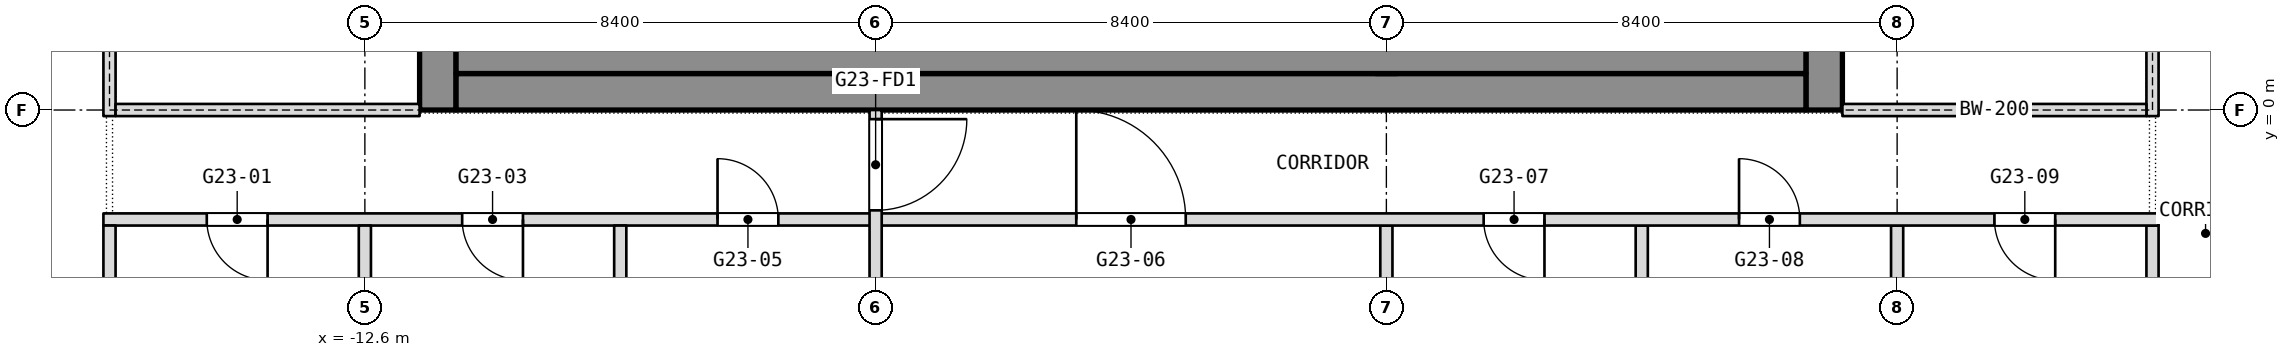
"""IFC4 building model, lengths in metres.
Left out: names, types, materials, properties, quantities, classifications, styles, units other than length and angle.
Written with IfcOpenShell. Run it as: python <this file> out.ifc"""

import sys

from ifc_helpers import new_model, si_unit, direction, frame, frame_2d, origin, place, context, subcontext, project, spatial, rectangle, extrude, element, fill, save


model = new_model("IFC4")
c1 = context("Model", 3, precision=1e-05, world=origin(), true_north=direction((0.0, 1.0)))
c2 = subcontext(c1, "Body", "Model", "MODEL_VIEW")
j1 = project(units=[si_unit("LENGTHUNIT", "METRE"), si_unit("PLANEANGLEUNIT", "RADIAN")], contexts=[c1])
p1 = place(None, origin())
s1 = spatial("IfcSite", under=j1, at=p1, CompositionType="ELEMENT")
p2 = place(p1, origin())
s2 = spatial("IfcBuilding", under=s1, at=p2, CompositionType="ELEMENT")
p3 = place(p2, frame((0.0, 0.0, 277.7)))
s3 = spatial("IfcBuildingStorey", under=s2, at=p3, CompositionType="ELEMENT", Elevation=277.7)
p4 = place(p3, frame((11.4, 0.0, 0.0), z_axis=(0.0, 0.0, 1.0), x_axis=(0.0, 1.0, 0.0)))
e1 = element("IfcWall", 1, at=p4, inside=s3, PredefinedType="SHEAR", context=c2, shape_type="SweptSolid", body=[
    extrude(rectangle(XDim=16.8, YDim=0.6, at=frame_2d((8.4, 0.0))), origin(), (0.0, 0.0, 1.0), 3.6),
])
p5 = place(p4, frame((2.3, 0.0, 0.0)))
e2 = element("IfcOpeningElement", 2, at=p5, cuts=e1, PredefinedType="OPENING", context=c2, shape_type="SweptSolid", body=[
    extrude(rectangle(XDim=1.1, YDim=2.1, at=frame_2d((0.55, 1.05))), frame((0.0, 0.3, 0.0), z_axis=(0.0, -1.0, 0.0), x_axis=(1.0, 0.0, 0.0)), (0.0, 0.0, 1.0), 0.6),
])
p6 = place(p4, frame((4.85, 0.0, 0.0)))
e3 = element("IfcOpeningElement", 3, at=p6, cuts=e1, PredefinedType="OPENING", context=c2, shape_type="SweptSolid", body=[
    extrude(rectangle(XDim=1.1, YDim=2.1, at=frame_2d((0.55, 1.05))), frame((0.0, 0.3, 0.0), z_axis=(0.0, -1.0, 0.0), x_axis=(1.0, 0.0, 0.0)), (0.0, 0.0, 1.0), 0.6),
])
p7 = place(p4, frame((6.825, 0.0, 0.0)))
e4 = element("IfcOpeningElement", 4, at=p7, cuts=e1, PredefinedType="OPENING", context=c2, shape_type="SweptSolid", body=[
    extrude(rectangle(XDim=1.2, YDim=2.1, at=frame_2d((0.6, 1.05))), frame((0.0, 0.3, 0.0), z_axis=(0.0, -1.0, 0.0), x_axis=(1.0, 0.0, 0.0)), (0.0, 0.0, 1.0), 0.6),
])
p8 = place(p4, frame((13.4, 0.0, 0.0)))
e5 = element("IfcOpeningElement", 5, at=p8, cuts=e1, PredefinedType="OPENING", context=c2, shape_type="SweptSolid", body=[
    extrude(rectangle(XDim=1.1, YDim=2.1, at=frame_2d((0.55, 1.05))), frame((0.0, 0.3, 0.0), z_axis=(0.0, -1.0, 0.0), x_axis=(1.0, 0.0, 0.0)), (0.0, 0.0, 1.0), 0.6),
])
p9 = place(p4, frame((10.85, 0.0, 0.0)))
e6 = element("IfcOpeningElement", 6, at=p9, cuts=e1, PredefinedType="OPENING", context=c2, shape_type="SweptSolid", body=[
    extrude(rectangle(XDim=1.1, YDim=2.1, at=frame_2d((0.55, 1.05))), frame((0.0, 0.3, 0.0), z_axis=(0.0, -1.0, 0.0), x_axis=(1.0, 0.0, 0.0)), (0.0, 0.0, 1.0), 0.6),
])
p10 = place(p4, frame((8.775, 0.0, 0.0)))
e7 = element("IfcOpeningElement", 7, at=p10, cuts=e1, PredefinedType="OPENING", context=c2, shape_type="SweptSolid", body=[
    extrude(rectangle(XDim=1.2, YDim=2.1, at=frame_2d((0.6, 1.05))), frame((0.0, 0.3, 0.0), z_axis=(0.0, -1.0, 0.0), x_axis=(1.0, 0.0, 0.0)), (0.0, 0.0, 1.0), 0.6),
])
p11 = place(p3, frame((-11.4, 0.0, 0.0), z_axis=(0.0, 0.0, 1.0), x_axis=(0.0, 1.0, 0.0)))
e8 = element("IfcWall", 8, at=p11, inside=s3, PredefinedType="SHEAR", context=c2, shape_type="SweptSolid", body=[
    extrude(rectangle(XDim=16.8, YDim=0.6, at=frame_2d((8.4, 0.0))), origin(), (0.0, 0.0, 1.0), 3.6),
])
p12 = place(p11, frame((1.688, 0.0, 0.0)))
e9 = element("IfcOpeningElement", 9, at=p12, cuts=e8, PredefinedType="OPENING", context=c2, shape_type="SweptSolid", body=[
    extrude(rectangle(XDim=0.9, YDim=2.1, at=frame_2d((0.45, 1.05))), frame((0.0, 0.3, 0.0), z_axis=(0.0, -1.0, 0.0), x_axis=(1.0, 0.0, 0.0)), (0.0, 0.0, 1.0), 0.6),
])
p13 = place(p11, frame((4.312, 0.0, 0.0)))
e10 = element("IfcOpeningElement", 10, at=p13, cuts=e8, PredefinedType="OPENING", context=c2, shape_type="SweptSolid", body=[
    extrude(rectangle(XDim=0.9, YDim=2.1, at=frame_2d((0.45, 1.05))), frame((0.0, 0.3, 0.0), z_axis=(0.0, -1.0, 0.0), x_axis=(1.0, 0.0, 0.0)), (0.0, 0.0, 1.0), 0.6),
])
p14 = place(p11, frame((6.825, 0.0, 0.0)))
e11 = element("IfcOpeningElement", 11, at=p14, cuts=e8, PredefinedType="OPENING", context=c2, shape_type="SweptSolid", body=[
    extrude(rectangle(XDim=1.2, YDim=2.1, at=frame_2d((0.6, 1.05))), frame((0.0, 0.3, 0.0), z_axis=(0.0, -1.0, 0.0), x_axis=(1.0, 0.0, 0.0)), (0.0, 0.0, 1.0), 0.6),
])
p15 = place(p11, frame((12.3, 0.0, 0.0)))
e12 = element("IfcOpeningElement", 12, at=p15, cuts=e8, PredefinedType="OPENING", context=c2, shape_type="SweptSolid", body=[
    extrude(rectangle(XDim=0.9, YDim=2.1, at=frame_2d((0.45, 1.05))), frame((0.0, 0.3, 0.0), z_axis=(0.0, -1.0, 0.0), x_axis=(1.0, 0.0, 0.0)), (0.0, 0.0, 1.0), 0.6),
])
p16 = place(p11, frame((8.775, 0.0, 0.0)))
e13 = element("IfcOpeningElement", 13, at=p16, cuts=e8, PredefinedType="OPENING", context=c2, shape_type="SweptSolid", body=[
    extrude(rectangle(XDim=1.2, YDim=2.1, at=frame_2d((0.6, 1.05))), frame((0.0, 0.3, 0.0), z_axis=(0.0, -1.0, 0.0), x_axis=(1.0, 0.0, 0.0)), (0.0, 0.0, 1.0), 0.6),
])
p17 = place(p3, frame((-11.1, 0.3, 0.0), z_axis=(0.0, 0.0, 1.0), x_axis=(1.0, 0.0, 0.0)))
e14 = element("IfcWall", 14, at=p17, inside=s3, PredefinedType="SHEAR", context=c2, shape_type="SweptSolid", body=[
    extrude(rectangle(XDim=22.2, YDim=0.6, at=frame_2d((11.1, 0.0))), origin(), (0.0, 0.0, 1.0), 3.6),
])
p18 = place(p3, frame((-4.2, 0.6, 0.0), z_axis=(0.0, 0.0, 1.0), x_axis=(0.0, 1.0, 0.0)))
e15 = element("IfcWall", 15, at=p18, inside=s3, PredefinedType="SHEAR", context=c2, shape_type="SweptSolid", body=[
    extrude(rectangle(XDim=15.6, YDim=0.35, at=frame_2d((7.8, 0.0))), origin(), (0.0, 0.0, 1.0), 3.6),
])
p19 = place(p18, frame((8.7, 0.0, 0.0)))
e16 = element("IfcOpeningElement", 16, at=p19, cuts=e15, PredefinedType="OPENING", context=c2, shape_type="SweptSolid", body=[
    extrude(rectangle(XDim=1.2, YDim=2.1, at=frame_2d((0.6, 1.05))), frame((0.0, 0.175, 0.0), z_axis=(0.0, -1.0, 0.0), x_axis=(1.0, 0.0, 0.0)), (0.0, 0.0, 1.0), 0.35),
])
p20 = place(p3, frame((4.2, 0.6, 0.0), z_axis=(0.0, 0.0, 1.0), x_axis=(0.0, 1.0, 0.0)))
e17 = element("IfcWall", 17, at=p20, inside=s3, PredefinedType="SHEAR", context=c2, shape_type="SweptSolid", body=[
    extrude(rectangle(XDim=15.6, YDim=0.35, at=frame_2d((7.8, 0.0))), origin(), (0.0, 0.0, 1.0), 3.6),
])
p21 = place(p20, frame((6.15, 0.0, 0.0)))
e18 = element("IfcOpeningElement", 18, at=p21, cuts=e17, PredefinedType="OPENING", context=c2, shape_type="SweptSolid", body=[
    extrude(rectangle(XDim=1.2, YDim=2.1, at=frame_2d((0.6, 1.05))), frame((0.0, 0.175, 0.0), z_axis=(0.0, -1.0, 0.0), x_axis=(1.0, 0.0, 0.0)), (0.0, 0.0, 1.0), 0.35),
])
p22 = place(p3, frame((16.8, -11.8, 0.0), z_axis=(0.0, 0.0, 1.0), x_axis=(0.0, 1.0, 0.0)))
e19 = element("IfcWall", 19, at=p22, inside=s3, PredefinedType="PARTITIONING", context=c2, shape_type="SweptSolid", body=[
    extrude(rectangle(XDim=9.9, YDim=0.2, at=frame_2d((4.95, 0.0))), origin(), (0.0, 0.0, 1.0), 3.34),
])
for number, where, z_axis, x_axis in (
    (20, (12.6, -11.6, 0.0), (0.0, 0.0, 1.0), (0.0, 1.0, 0.0)),
    (21, (8.4, -11.6, 0.0), (0.0, 0.0, 1.0), (0.0, 1.0, 0.0)),
    (22, (4.2, -11.6, 0.0), (0.0, 0.0, 1.0), (0.0, 1.0, 0.0)),
):
    element("IfcWall", number, at=place(p3, frame(where, z_axis=z_axis, x_axis=x_axis)), inside=s3, PredefinedType="PARTITIONING", context=c2, shape_type="SweptSolid", body=[
        extrude(rectangle(XDim=9.7, YDim=0.2, at=frame_2d((4.85, 0.0))), origin(), (0.0, 0.0, 1.0), 3.34),
    ])
p23 = place(p3, frame((-16.9, -1.8, 0.0), z_axis=(0.0, 0.0, 1.0), x_axis=(1.0, 0.0, 0.0)))
e23 = element("IfcWall", 23, at=p23, inside=s3, PredefinedType="PARTITIONING", context=c2, shape_type="SweptSolid", body=[
    extrude(rectangle(XDim=33.8, YDim=0.2, at=frame_2d((16.9, 0.0))), origin(), (0.0, 0.0, 1.0), 3.34),
])
p24 = place(p23, frame((1.7, 0.0, 0.0)))
e24 = element("IfcOpeningElement", 24, at=p24, cuts=e23, PredefinedType="OPENING", context=c2, shape_type="SweptSolid", body=[
    extrude(rectangle(XDim=1.0, YDim=2.1, at=frame_2d((0.5, 1.05))), frame((0.0, 0.1, 0.0), z_axis=(0.0, -1.0, 0.0), x_axis=(1.0, 0.0, 0.0)), (0.0, 0.0, 1.0), 0.2),
])
p25 = place(p23, frame((5.9, 0.0, 0.0)))
e25 = element("IfcOpeningElement", 25, at=p25, cuts=e23, PredefinedType="OPENING", context=c2, shape_type="SweptSolid", body=[
    extrude(rectangle(XDim=1.0, YDim=2.1, at=frame_2d((0.5, 1.05))), frame((0.0, 0.1, 0.0), z_axis=(0.0, -1.0, 0.0), x_axis=(1.0, 0.0, 0.0)), (0.0, 0.0, 1.0), 0.2),
])
p26 = place(p23, frame((10.1, 0.0, 0.0)))
e26 = element("IfcOpeningElement", 26, at=p26, cuts=e23, PredefinedType="OPENING", context=c2, shape_type="SweptSolid", body=[
    extrude(rectangle(XDim=1.0, YDim=2.1, at=frame_2d((0.5, 1.05))), frame((0.0, 0.1, 0.0), z_axis=(0.0, -1.0, 0.0), x_axis=(1.0, 0.0, 0.0)), (0.0, 0.0, 1.0), 0.2),
])
p27 = place(p23, frame((16.0, 0.0, 0.0)))
e27 = element("IfcOpeningElement", 27, at=p27, cuts=e23, PredefinedType="OPENING", context=c2, shape_type="SweptSolid", body=[
    extrude(rectangle(XDim=1.8, YDim=2.1, at=frame_2d((0.9, 1.05))), frame((0.0, 0.1, 0.0), z_axis=(0.0, -1.0, 0.0), x_axis=(1.0, 0.0, 0.0)), (0.0, 0.0, 1.0), 0.2),
])
p28 = place(p23, frame((22.7, 0.0, 0.0)))
e28 = element("IfcOpeningElement", 28, at=p28, cuts=e23, PredefinedType="OPENING", context=c2, shape_type="SweptSolid", body=[
    extrude(rectangle(XDim=1.0, YDim=2.1, at=frame_2d((0.5, 1.05))), frame((0.0, 0.1, 0.0), z_axis=(0.0, -1.0, 0.0), x_axis=(1.0, 0.0, 0.0)), (0.0, 0.0, 1.0), 0.2),
])
p29 = place(p23, frame((26.9, 0.0, 0.0)))
e29 = element("IfcOpeningElement", 29, at=p29, cuts=e23, PredefinedType="OPENING", context=c2, shape_type="SweptSolid", body=[
    extrude(rectangle(XDim=1.0, YDim=2.1, at=frame_2d((0.5, 1.05))), frame((0.0, 0.1, 0.0), z_axis=(0.0, -1.0, 0.0), x_axis=(1.0, 0.0, 0.0)), (0.0, 0.0, 1.0), 0.2),
])
p30 = place(p23, frame((31.1, 0.0, 0.0)))
e30 = element("IfcOpeningElement", 30, at=p30, cuts=e23, PredefinedType="OPENING", context=c2, shape_type="SweptSolid", body=[
    extrude(rectangle(XDim=1.0, YDim=2.1, at=frame_2d((0.5, 1.05))), frame((0.0, 0.1, 0.0), z_axis=(0.0, -1.0, 0.0), x_axis=(1.0, 0.0, 0.0)), (0.0, 0.0, 1.0), 0.2),
])
p31 = place(p3, frame((-4.2, -13.6, 0.0), z_axis=(0.0, 0.0, 1.0), x_axis=(0.0, 1.0, 0.0)))
e31 = element("IfcWall", 31, at=p31, inside=s3, PredefinedType="PARTITIONING", context=c2, shape_type="SweptSolid", body=[
    extrude(rectangle(XDim=13.6, YDim=0.2, at=frame_2d((6.8, 0.0))), origin(), (0.0, 0.0, 1.0), 3.34),
])
p32 = place(p31, frame((11.95, 0.0, 0.0)))
e32 = element("IfcOpeningElement", 32, at=p32, cuts=e31, PredefinedType="OPENING", context=c2, shape_type="SweptSolid", body=[
    extrude(rectangle(XDim=1.5, YDim=2.1, at=frame_2d((0.75, 1.05))), frame((0.0, 0.1, 0.0), z_axis=(0.0, -1.0, 0.0), x_axis=(1.0, 0.0, 0.0)), (0.0, 0.0, 1.0), 0.2),
])
p33 = place(p31, frame((0.25, 0.0, 0.0)))
e33 = element("IfcOpeningElement", 33, at=p33, cuts=e31, PredefinedType="OPENING", context=c2, shape_type="SweptSolid", body=[
    extrude(rectangle(XDim=1.5, YDim=2.1, at=frame_2d((0.75, 1.05))), frame((0.0, 0.1, 0.0), z_axis=(0.0, -1.0, 0.0), x_axis=(1.0, 0.0, 0.0)), (0.0, 0.0, 1.0), 0.2),
])
for number, where, z_axis, x_axis in (
    (34, (-8.4, -8.5, 0.0), (0.0, 0.0, 1.0), (0.0, 1.0, 0.0)),
    (35, (-12.6, -8.5, 0.0), (0.0, 0.0, 1.0), (0.0, 1.0, 0.0)),
):
    element("IfcWall", number, at=place(p3, frame(where, z_axis=z_axis, x_axis=x_axis)), inside=s3, PredefinedType="PARTITIONING", context=c2, shape_type="SweptSolid", body=[
        extrude(rectangle(XDim=6.6, YDim=0.2, at=frame_2d((3.3, 0.0))), origin(), (0.0, 0.0, 1.0), 3.34),
    ])
p34 = place(p3, frame((-16.8, -8.7, 0.0), z_axis=(0.0, 0.0, 1.0), x_axis=(0.0, 1.0, 0.0)))
e36 = element("IfcWall", 36, at=p34, inside=s3, PredefinedType="PARTITIONING", context=c2, shape_type="SweptSolid", body=[
    extrude(rectangle(XDim=6.8, YDim=0.2, at=frame_2d((3.4, 0.0))), origin(), (0.0, 0.0, 1.0), 3.34),
])
p35 = place(p3, frame((-11.1, 1.05, 0.0), z_axis=(0.0, 0.0, 1.0), x_axis=(1.0, 0.0, 0.0)))
e37 = element("IfcWall", 37, at=p35, inside=s3, PredefinedType="PARTITIONING", context=c2, shape_type="SweptSolid", body=[
    extrude(rectangle(XDim=22.2, YDim=0.9, at=frame_2d((11.1, 0.0))), origin(), (0.0, 0.0, 1.0), 3.34),
])
p36 = place(p3, frame((-16.8, -0.1, 0.0), z_axis=(0.0, 0.0, 1.0), x_axis=(0.0, 1.0, 0.0)))
e38 = element("IfcWall", 38, at=p36, inside=s3, PredefinedType="PARTITIONING", context=c2, shape_type="SweptSolid", body=[
    extrude(rectangle(XDim=17.0, YDim=0.2, at=frame_2d((8.5, 0.0))), origin(), (0.0, 0.0, 1.0), 3.34),
])
p37 = place(p36, frame((2.2, 0.0, 0.0)))
e39 = element("IfcOpeningElement", 39, at=p37, cuts=e38, PredefinedType="OPENING", context=c2, shape_type="SweptSolid", body=[
    extrude(rectangle(XDim=1.8, YDim=2.1, at=frame_2d((0.9, 1.05))), frame((0.0, 0.1, 0.0), z_axis=(0.0, -1.0, 0.0), x_axis=(1.0, 0.0, 0.0)), (0.0, 0.0, 1.0), 0.2),
])
p38 = place(p36, frame((10.6, 0.0, 0.0)))
e40 = element("IfcOpeningElement", 40, at=p38, cuts=e38, PredefinedType="OPENING", context=c2, shape_type="SweptSolid", body=[
    extrude(rectangle(XDim=1.8, YDim=2.1, at=frame_2d((0.9, 1.05))), frame((0.0, 0.1, 0.0), z_axis=(0.0, -1.0, 0.0), x_axis=(1.0, 0.0, 0.0)), (0.0, 0.0, 1.0), 0.2),
])
p39 = place(p3, frame((-16.7, 0.0, 0.0), z_axis=(0.0, 0.0, 1.0), x_axis=(1.0, 0.0, 0.0)))
e41 = element("IfcWall", 41, at=p39, inside=s3, PredefinedType="PARTITIONING", context=c2, shape_type="SweptSolid", body=[
    extrude(rectangle(XDim=5.0, YDim=0.2, at=frame_2d((2.5, 0.0))), origin(), (0.0, 0.0, 1.0), 3.0),
])
p40 = place(p3, frame((16.8, -0.1, 0.0), z_axis=(0.0, 0.0, 1.0), x_axis=(0.0, 1.0, 0.0)))
e42 = element("IfcWall", 42, at=p40, inside=s3, PredefinedType="PARTITIONING", context=c2, shape_type="SweptSolid", body=[
    extrude(rectangle(XDim=17.0, YDim=0.2, at=frame_2d((8.5, 0.0))), origin(), (0.0, 0.0, 1.0), 3.34),
])
p41 = place(p40, frame((2.2, 0.0, 0.0)))
e43 = element("IfcOpeningElement", 43, at=p41, cuts=e42, PredefinedType="OPENING", context=c2, shape_type="SweptSolid", body=[
    extrude(rectangle(XDim=1.8, YDim=2.1, at=frame_2d((0.9, 1.05))), frame((0.0, 0.1, 0.0), z_axis=(0.0, -1.0, 0.0), x_axis=(1.0, 0.0, 0.0)), (0.0, 0.0, 1.0), 0.2),
])
p42 = place(p40, frame((10.6, 0.0, 0.0)))
e44 = element("IfcOpeningElement", 44, at=p42, cuts=e42, PredefinedType="OPENING", context=c2, shape_type="SweptSolid", body=[
    extrude(rectangle(XDim=1.8, YDim=2.1, at=frame_2d((0.9, 1.05))), frame((0.0, 0.1, 0.0), z_axis=(0.0, -1.0, 0.0), x_axis=(1.0, 0.0, 0.0)), (0.0, 0.0, 1.0), 0.2),
])
p43 = place(p3, frame((11.7, 0.0, 0.0), z_axis=(0.0, 0.0, 1.0), x_axis=(1.0, 0.0, 0.0)))
e45 = element("IfcWall", 45, at=p43, inside=s3, PredefinedType="PARTITIONING", context=c2, shape_type="SweptSolid", body=[
    extrude(rectangle(XDim=5.0, YDim=0.2, at=frame_2d((2.5, 0.0))), origin(), (0.0, 0.0, 1.0), 3.0),
])
p44 = place(p24, origin())
e46 = element("IfcDoor", 46, at=p44, inside=s3, OperationType="SINGLE_SWING_LEFT", PredefinedType="DOOR", context=c2, shape_type="SweptSolid", body=[
    extrude(rectangle(XDim=1.0, YDim=2.1, at=frame_2d((0.5, 1.05))), frame((0.0, 0.025, 0.0), z_axis=(0.0, -1.0, 0.0), x_axis=(1.0, 0.0, 0.0)), (0.0, 0.0, 1.0), 0.05),
])
fill(e24, e46)
p45 = place(p25, origin())
e47 = element("IfcDoor", 47, at=p45, inside=s3, OperationType="SINGLE_SWING_LEFT", PredefinedType="DOOR", context=c2, shape_type="SweptSolid", body=[
    extrude(rectangle(XDim=1.0, YDim=2.1, at=frame_2d((0.5, 1.05))), frame((0.0, 0.025, 0.0), z_axis=(0.0, -1.0, 0.0), x_axis=(1.0, 0.0, 0.0)), (0.0, 0.0, 1.0), 0.05),
])
fill(e25, e47)
p46 = place(p26, origin())
e48 = element("IfcDoor", 48, at=p46, inside=s3, OperationType="SINGLE_SWING_RIGHT", PredefinedType="DOOR", context=c2, shape_type="SweptSolid", body=[
    extrude(rectangle(XDim=1.0, YDim=2.1, at=frame_2d((0.5, 1.05))), frame((0.0, 0.025, 0.0), z_axis=(0.0, -1.0, 0.0), x_axis=(1.0, 0.0, 0.0)), (0.0, 0.0, 1.0), 0.05),
])
fill(e26, e48)
p47 = place(p27, origin())
e49 = element("IfcDoor", 49, at=p47, inside=s3, OperationType="DOUBLE_DOOR_SINGLE_SWING", PredefinedType="DOOR", context=c2, shape_type="SweptSolid", body=[
    extrude(rectangle(XDim=1.8, YDim=2.1, at=frame_2d((0.9, 1.05))), frame((0.0, 0.025, 0.0), z_axis=(0.0, -1.0, 0.0), x_axis=(1.0, 0.0, 0.0)), (0.0, 0.0, 1.0), 0.05),
])
fill(e27, e49)
p48 = place(p28, origin())
e50 = element("IfcDoor", 50, at=p48, inside=s3, OperationType="SINGLE_SWING_RIGHT", PredefinedType="DOOR", context=c2, shape_type="SweptSolid", body=[
    extrude(rectangle(XDim=1.0, YDim=2.1, at=frame_2d((0.5, 1.05))), frame((0.0, 0.025, 0.0), z_axis=(0.0, -1.0, 0.0), x_axis=(1.0, 0.0, 0.0)), (0.0, 0.0, 1.0), 0.05),
])
fill(e28, e50)
p49 = place(p29, origin())
e51 = element("IfcDoor", 51, at=p49, inside=s3, OperationType="SINGLE_SWING_LEFT", PredefinedType="DOOR", context=c2, shape_type="SweptSolid", body=[
    extrude(rectangle(XDim=1.0, YDim=2.1, at=frame_2d((0.5, 1.05))), frame((0.0, 0.025, 0.0), z_axis=(0.0, -1.0, 0.0), x_axis=(1.0, 0.0, 0.0)), (0.0, 0.0, 1.0), 0.05),
])
fill(e29, e51)
p50 = place(p30, origin())
e52 = element("IfcDoor", 52, at=p50, inside=s3, OperationType="SINGLE_SWING_RIGHT", PredefinedType="DOOR", context=c2, shape_type="SweptSolid", body=[
    extrude(rectangle(XDim=1.0, YDim=2.1, at=frame_2d((0.5, 1.05))), frame((0.0, 0.025, 0.0), z_axis=(0.0, -1.0, 0.0), x_axis=(1.0, 0.0, 0.0)), (0.0, 0.0, 1.0), 0.05),
])
fill(e30, e52)
p51 = place(p32, origin())
e53 = element("IfcDoor", 53, at=p51, inside=s3, OperationType="DOUBLE_DOOR_DOUBLE_SWING", PredefinedType="DOOR", context=c2, shape_type="SweptSolid", body=[
    extrude(rectangle(XDim=1.5, YDim=2.1, at=frame_2d((0.75, 1.05))), frame((0.0, 0.025, 0.0), z_axis=(0.0, -1.0, 0.0), x_axis=(1.0, 0.0, 0.0)), (0.0, 0.0, 1.0), 0.05),
])
fill(e32, e53)
save(model, sys.argv[1])
